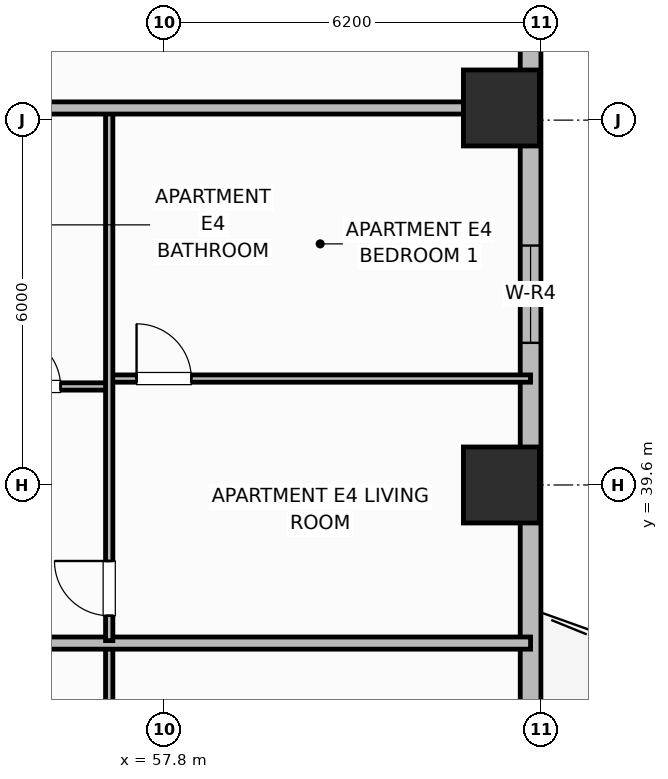
"""IFC4 building model, lengths in metres.
Left out: names, types, materials, properties, quantities, classifications, styles, units other than length and angle.
Written with IfcOpenShell. Run it as: python <this file> out.ifc"""

import sys

from ifc_helpers import new_model, si_unit, direction, frame, frame_2d, origin, origin_2d, place, context, subcontext, project, spatial, rectangle, extrude, element, fill, save


model = new_model("IFC4")
c1 = context("Model", 3, precision=1e-05, world=origin(), true_north=direction((0.0, 1.0)))
c2 = subcontext(c1, "Body", "Model", "MODEL_VIEW")
j1 = project(units=[si_unit("LENGTHUNIT", "METRE"), si_unit("PLANEANGLEUNIT", "RADIAN")], contexts=[c1])
p1 = place(None, origin())
s1 = spatial("IfcSite", under=j1, at=p1, CompositionType="ELEMENT")
p2 = place(p1, origin())
s2 = spatial("IfcBuilding", under=s1, at=p2, CompositionType="ELEMENT")
p3 = place(p2, frame((0.0, 0.0, 58.4)))
s3 = spatial("IfcBuildingStorey", under=s2, at=p3, CompositionType="ELEMENT", Elevation=58.4)
for number, where, z_axis, x_axis in (
    (1, (63.35, 39.6, 0.0), (0.0, 0.0, 1.0), (1.0, 0.0, 0.0)),
    (2, (63.35, 45.8, 0.0), (0.0, 0.0, 1.0), (1.0, 0.0, 0.0)),
):
    element("IfcColumn", number, at=place(p3, frame(where, z_axis=z_axis, x_axis=x_axis)), inside=s3, PredefinedType="COLUMN", context=c2, shape_type="SweptSolid", body=[
        extrude(rectangle(XDim=1.25, YDim=1.25, at=origin_2d()), origin(), (0.0, 0.0, 1.0), 3.7),
    ])
p4 = place(p3, frame((63.83, 32.6, 0.0), z_axis=(0.0, 0.0, 1.0), x_axis=(0.0, 1.0, 0.0)))
e3 = element("IfcWall", 3, at=p4, inside=s3, PredefinedType="SOLIDWALL", context=c2, shape_type="SweptSolid", body=[
    extrude(rectangle(XDim=14.8, YDim=0.34, at=frame_2d((7.4, 0.0))), origin(), (0.0, 0.0, 1.0), 2.7),
])
p5 = place(p4, frame((1.7, 0.0, 0.0)))
e4 = element("IfcOpeningElement", 4, at=p5, cuts=e3, PredefinedType="OPENING", context=c2, shape_type="SweptSolid", body=[
    extrude(rectangle(XDim=1.6, YDim=2.1, at=frame_2d((0.8, 1.05))), frame((0.0, 0.18, 0.0), z_axis=(0.0, -1.0, 0.0), x_axis=(1.0, 0.0, 0.0)), (0.0, 0.0, 1.0), 0.36),
])
p6 = place(p4, frame((9.337, 0.0, 0.68)))
e5 = element("IfcOpeningElement", 5, at=p6, cuts=e3, PredefinedType="OPENING", context=c2, shape_type="SweptSolid", body=[
    extrude(rectangle(XDim=1.6, YDim=1.9, at=frame_2d((0.8, 0.95))), frame((0.0, 0.18, 0.0), z_axis=(0.0, -1.0, 0.0), x_axis=(1.0, 0.0, 0.0)), (0.0, 0.0, 1.0), 0.36),
])
p7 = place(p3, frame((56.9, 26.64, 0.0), z_axis=(0.0, 0.0, 1.0), x_axis=(0.0, 1.0, 0.0)))
e6 = element("IfcWall", 6, at=p7, inside=s3, PredefinedType="PARTITIONING", context=c2, shape_type="SweptSolid", body=[
    extrude(rectangle(XDim=10.32, YDim=0.12, at=frame_2d((5.16, 0.0))), origin(), (0.0, 0.0, 1.0), 2.53),
])
p8 = place(p7, frame((0.56, 0.0, 0.0)))
e7 = element("IfcOpeningElement", 7, at=p8, cuts=e6, PredefinedType="OPENING", context=c2, shape_type="SweptSolid", body=[
    extrude(rectangle(XDim=0.9, YDim=2.1, at=frame_2d((0.45, 1.05))), frame((0.0, 0.07, 0.0), z_axis=(0.0, -1.0, 0.0), x_axis=(1.0, 0.0, 0.0)), (0.0, 0.0, 1.0), 0.14),
])
p9 = place(p3, frame((54.65, 37.0, 0.0), z_axis=(0.0, 0.0, 1.0), x_axis=(1.0, 0.0, 0.0)))
e8 = element("IfcWall", 8, at=p9, inside=s3, PredefinedType="PARTITIONING", context=c2, shape_type="SweptSolid", body=[
    extrude(rectangle(XDim=9.18, YDim=0.2, at=frame_2d((4.59, 0.0))), origin(), (0.0, 0.0, 1.0), 2.53),
])
p10 = place(p3, frame((54.65, 41.22, 0.0), z_axis=(0.0, 0.0, 1.0), x_axis=(1.0, 0.0, 0.0)))
e9 = element("IfcWall", 9, at=p10, inside=s3, PredefinedType="PARTITIONING", context=c2, shape_type="SweptSolid", body=[
    extrude(rectangle(XDim=2.25, YDim=0.12, at=frame_2d((1.125, 0.0))), origin(), (0.0, 0.0, 1.0), 2.53),
])
p11 = place(p10, frame((0.6, 0.0, 0.0)))
e10 = element("IfcOpeningElement", 10, at=p11, cuts=e9, PredefinedType="OPENING", context=c2, shape_type="SweptSolid", body=[
    extrude(rectangle(XDim=0.85, YDim=2.1, at=frame_2d((0.425, 1.05))), frame((0.0, 0.07, 0.0), z_axis=(0.0, -1.0, 0.0), x_axis=(1.0, 0.0, 0.0)), (0.0, 0.0, 1.0), 0.14),
])
p12 = place(p3, frame((56.9, 41.35, 0.0), z_axis=(0.0, 0.0, 1.0), x_axis=(1.0, 0.0, 0.0)))
e11 = element("IfcWall", 11, at=p12, inside=s3, PredefinedType="PARTITIONING", context=c2, shape_type="SweptSolid", body=[
    extrude(rectangle(XDim=6.93, YDim=0.12, at=frame_2d((3.465, 0.0))), origin(), (0.0, 0.0, 1.0), 2.53),
])
p13 = place(p12, frame((0.45, 0.0, 0.0)))
e12 = element("IfcOpeningElement", 12, at=p13, cuts=e11, PredefinedType="OPENING", context=c2, shape_type="SweptSolid", body=[
    extrude(rectangle(XDim=0.9, YDim=2.1, at=frame_2d((0.45, 1.05))), frame((0.0, 0.07, 0.0), z_axis=(0.0, -1.0, 0.0), x_axis=(1.0, 0.0, 0.0)), (0.0, 0.0, 1.0), 0.14),
])
p14 = place(p3, frame((56.9, 37.04, 0.0), z_axis=(0.0, 0.0, 1.0), x_axis=(0.0, 1.0, 0.0)))
e13 = element("IfcWall", 13, at=p14, inside=s3, PredefinedType="PARTITIONING", context=c2, shape_type="SweptSolid", body=[
    extrude(rectangle(XDim=8.72, YDim=0.12, at=frame_2d((4.36, 0.0))), origin(), (0.0, 0.0, 1.0), 2.53),
])
p15 = place(p14, frame((0.41, 0.0, 0.0)))
e14 = element("IfcOpeningElement", 14, at=p15, cuts=e13, PredefinedType="OPENING", context=c2, shape_type="SweptSolid", body=[
    extrude(rectangle(XDim=0.9, YDim=2.1, at=frame_2d((0.45, 1.05))), frame((0.0, 0.07, 0.0), z_axis=(0.0, -1.0, 0.0), x_axis=(1.0, 0.0, 0.0)), (0.0, 0.0, 1.0), 0.14),
])
p16 = place(p3, frame((54.65, 45.8, 0.0), z_axis=(0.0, 0.0, 1.0), x_axis=(1.0, 0.0, 0.0)))
e15 = element("IfcWall", 15, at=p16, inside=s3, PredefinedType="PARTITIONING", context=c2, shape_type="SweptSolid", body=[
    extrude(rectangle(XDim=8.76, YDim=0.2, at=frame_2d((4.38, 0.0))), origin(), (0.0, 0.0, 1.0), 2.53),
])
p17 = place(p6, origin())
e16 = element("IfcWindow", 16, at=p17, inside=s3, PartitioningType="SINGLE_PANEL", PredefinedType="WINDOW", context=c2, shape_type="SweptSolid", body=[
    extrude(rectangle(XDim=1.6, YDim=1.9, at=frame_2d((0.8, 0.95))), frame((0.0, 0.03, 0.0), z_axis=(0.0, -1.0, 0.0), x_axis=(1.0, 0.0, 0.0)), (0.0, 0.0, 1.0), 0.06),
])
fill(e5, e16)
p18 = place(p11, origin())
e17 = element("IfcDoor", 17, at=p18, inside=s3, OperationType="SINGLE_SWING_LEFT", PredefinedType="DOOR", context=c2, shape_type="SweptSolid", body=[
    extrude(rectangle(XDim=0.85, YDim=2.1, at=frame_2d((0.425, 1.05))), frame((0.0, 0.025, 0.0), z_axis=(0.0, -1.0, 0.0), x_axis=(1.0, 0.0, 0.0)), (0.0, 0.0, 1.0), 0.05),
])
fill(e10, e17)
p19 = place(p13, origin())
e18 = element("IfcDoor", 18, at=p19, inside=s3, OperationType="SINGLE_SWING_LEFT", PredefinedType="DOOR", context=c2, shape_type="SweptSolid", body=[
    extrude(rectangle(XDim=0.9, YDim=2.1, at=frame_2d((0.45, 1.05))), frame((0.0, 0.025, 0.0), z_axis=(0.0, -1.0, 0.0), x_axis=(1.0, 0.0, 0.0)), (0.0, 0.0, 1.0), 0.05),
])
fill(e12, e18)
p20 = place(p15, origin())
e19 = element("IfcDoor", 19, at=p20, inside=s3, OperationType="SINGLE_SWING_RIGHT", PredefinedType="DOOR", context=c2, shape_type="SweptSolid", body=[
    extrude(rectangle(XDim=0.9, YDim=2.1, at=frame_2d((0.45, 1.05))), frame((0.0, 0.025, 0.0), z_axis=(0.0, -1.0, 0.0), x_axis=(1.0, 0.0, 0.0)), (0.0, 0.0, 1.0), 0.05),
])
fill(e14, e19)
save(model, sys.argv[1])
